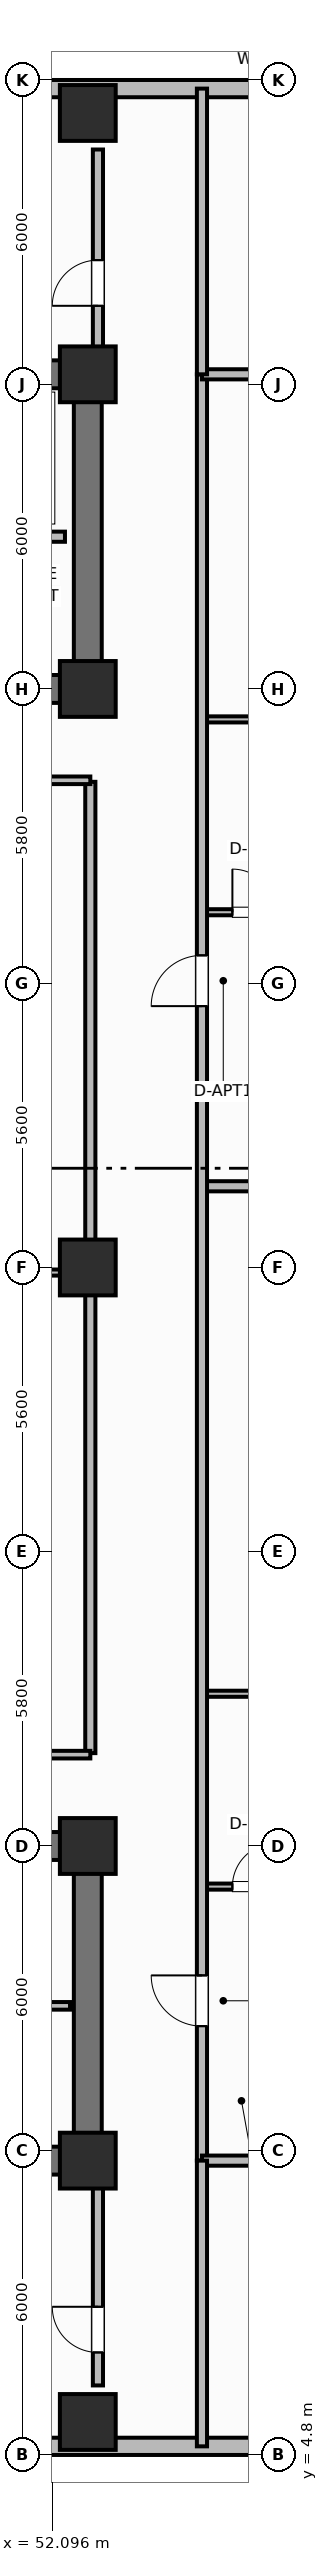
"""IFC4 building model, lengths in metres.
Left out: names, types, materials, properties, quantities, classifications, styles, units other than length and angle.
Written with IfcOpenShell. Run it as: python <this file> out.ifc"""

import sys

from ifc_helpers import new_model, si_unit, direction, frame, frame_2d, origin, origin_2d, place, context, subcontext, project, spatial, rectangle, extrude, element, fill, save


model = new_model("IFC4")
c1 = context("Model", 3, precision=1e-05, world=origin(), true_north=direction((0.0, 1.0)))
c2 = subcontext(c1, "Body", "Model", "MODEL_VIEW")
j1 = project(units=[si_unit("LENGTHUNIT", "METRE"), si_unit("PLANEANGLEUNIT", "RADIAN")], contexts=[c1])
p1 = place(None, origin())
s1 = spatial("IfcSite", under=j1, at=p1, CompositionType="ELEMENT")
p2 = place(p1, origin())
s2 = spatial("IfcBuilding", under=s1, at=p2, CompositionType="ELEMENT")
p3 = place(p2, frame((0.0, 0.0, 129.0)))
s3 = spatial("IfcBuildingStorey", under=s2, at=p3, CompositionType="ELEMENT", Elevation=129.0)
p4 = place(p3, frame((52.8, 10.6, 0.0), z_axis=(0.0, 0.0, 1.0), x_axis=(-1.0, 0.0, 0.0)))
e1 = element("IfcWall", 1, at=p4, inside=s3, PredefinedType="SHEAR", context=c2, shape_type="SweptSolid", body=[
    extrude(rectangle(XDim=27.2, YDim=0.55, at=frame_2d((13.6, 0.0))), origin(), (0.0, 0.0, 1.0), 3.7),
])
p5 = place(p3, frame((52.8, 10.875, 0.0), z_axis=(0.0, 0.0, 1.0), x_axis=(0.0, 1.0, 0.0)))
e2 = element("IfcWall", 2, at=p5, inside=s3, PredefinedType="SHEAR", context=c2, shape_type="SweptSolid", body=[
    extrude(rectangle(XDim=5.65, YDim=0.55, at=frame_2d((2.825, 0.0))), origin(), (0.0, 0.0, 1.0), 3.7),
])
p6 = place(p3, frame((25.6, 16.8, 0.0), z_axis=(0.0, 0.0, 1.0), x_axis=(1.0, 0.0, 0.0)))
e3 = element("IfcWall", 3, at=p6, inside=s3, PredefinedType="SHEAR", context=c2, shape_type="SweptSolid", body=[
    extrude(rectangle(XDim=27.2, YDim=0.55, at=frame_2d((13.6, 0.0))), origin(), (0.0, 0.0, 1.0), 3.7),
])
p7 = place(p6, frame((1.7, 0.0, 0.0)))
e4 = element("IfcOpeningElement", 4, at=p7, cuts=e3, PredefinedType="OPENING", context=c2, shape_type="SweptSolid", body=[
    extrude(rectangle(XDim=1.1, YDim=2.15, at=frame_2d((0.55, 1.075))), frame((0.0, 0.285, 0.0), z_axis=(0.0, -1.0, 0.0), x_axis=(1.0, 0.0, 0.0)), (0.0, 0.0, 1.0), 0.57),
])
p8 = place(p6, frame((4.45, 0.0, 0.0)))
e5 = element("IfcOpeningElement", 5, at=p8, cuts=e3, PredefinedType="OPENING", context=c2, shape_type="SweptSolid", body=[
    extrude(rectangle(XDim=0.85, YDim=2.1, at=frame_2d((0.425, 1.05))), frame((0.0, 0.285, 0.0), z_axis=(0.0, -1.0, 0.0), x_axis=(1.0, 0.0, 0.0)), (0.0, 0.0, 1.0), 0.57),
])
p9 = place(p6, frame((6.5, 0.0, 0.0)))
e6 = element("IfcOpeningElement", 6, at=p9, cuts=e3, PredefinedType="OPENING", context=c2, shape_type="SweptSolid", body=[
    extrude(rectangle(XDim=0.85, YDim=2.1, at=frame_2d((0.425, 1.05))), frame((0.0, 0.285, 0.0), z_axis=(0.0, -1.0, 0.0), x_axis=(1.0, 0.0, 0.0)), (0.0, 0.0, 1.0), 0.57),
])
p10 = place(p6, frame((13.0, 0.0, 0.0)))
e7 = element("IfcOpeningElement", 7, at=p10, cuts=e3, PredefinedType="OPENING", context=c2, shape_type="SweptSolid", body=[
    extrude(rectangle(XDim=1.2, YDim=2.15, at=frame_2d((0.6, 1.075))), frame((0.0, 0.285, 0.0), z_axis=(0.0, -1.0, 0.0), x_axis=(1.0, 0.0, 0.0)), (0.0, 0.0, 1.0), 0.57),
])
p11 = place(p6, frame((19.8, 0.0, 0.0)))
e8 = element("IfcOpeningElement", 8, at=p11, cuts=e3, PredefinedType="OPENING", context=c2, shape_type="SweptSolid", body=[
    extrude(rectangle(XDim=0.85, YDim=2.1, at=frame_2d((0.425, 1.05))), frame((0.0, 0.285, 0.0), z_axis=(0.0, -1.0, 0.0), x_axis=(1.0, 0.0, 0.0)), (0.0, 0.0, 1.0), 0.57),
])
p12 = place(p6, frame((24.2, 0.0, 0.0)))
e9 = element("IfcOpeningElement", 9, at=p12, cuts=e3, PredefinedType="OPENING", context=c2, shape_type="SweptSolid", body=[
    extrude(rectangle(XDim=0.85, YDim=2.1, at=frame_2d((0.425, 1.05))), frame((0.0, 0.285, 0.0), z_axis=(0.0, -1.0, 0.0), x_axis=(1.0, 0.0, 0.0)), (0.0, 0.0, 1.0), 0.57),
])
p13 = place(p3, frame((25.6, 45.8, 0.0), z_axis=(0.0, 0.0, 1.0), x_axis=(1.0, 0.0, 0.0)))
e10 = element("IfcWall", 10, at=p13, inside=s3, PredefinedType="SHEAR", context=c2, shape_type="SweptSolid", body=[
    extrude(rectangle(XDim=27.2, YDim=0.55, at=frame_2d((13.6, 0.0))), origin(), (0.0, 0.0, 1.0), 3.7),
])
p14 = place(p3, frame((52.8, 39.875, 0.0), z_axis=(0.0, 0.0, 1.0), x_axis=(0.0, 1.0, 0.0)))
e11 = element("IfcWall", 11, at=p14, inside=s3, PredefinedType="SHEAR", context=c2, shape_type="SweptSolid", body=[
    extrude(rectangle(XDim=5.65, YDim=0.55, at=frame_2d((2.825, 0.0))), origin(), (0.0, 0.0, 1.0), 3.7),
])
p15 = place(p3, frame((52.8, 39.6, 0.0), z_axis=(0.0, 0.0, 1.0), x_axis=(-1.0, 0.0, 0.0)))
e12 = element("IfcWall", 12, at=p15, inside=s3, PredefinedType="SHEAR", context=c2, shape_type="SweptSolid", body=[
    extrude(rectangle(XDim=27.2, YDim=0.55, at=frame_2d((13.6, 0.0))), origin(), (0.0, 0.0, 1.0), 3.7),
])
p16 = place(p15, frame((24.3, 0.0, 0.0)))
e13 = element("IfcOpeningElement", 13, at=p16, cuts=e12, PredefinedType="OPENING", context=c2, shape_type="SweptSolid", body=[
    extrude(rectangle(XDim=1.1, YDim=2.15, at=frame_2d((0.55, 1.075))), frame((0.0, 0.285, 0.0), z_axis=(0.0, -1.0, 0.0), x_axis=(1.0, 0.0, 0.0)), (0.0, 0.0, 1.0), 0.57),
])
p17 = place(p15, frame((21.85, 0.0, 0.0)))
e14 = element("IfcOpeningElement", 14, at=p17, cuts=e12, PredefinedType="OPENING", context=c2, shape_type="SweptSolid", body=[
    extrude(rectangle(XDim=0.85, YDim=2.1, at=frame_2d((0.425, 1.05))), frame((0.0, 0.285, 0.0), z_axis=(0.0, -1.0, 0.0), x_axis=(1.0, 0.0, 0.0)), (0.0, 0.0, 1.0), 0.57),
])
p18 = place(p15, frame((19.85, 0.0, 0.0)))
e15 = element("IfcOpeningElement", 15, at=p18, cuts=e12, PredefinedType="OPENING", context=c2, shape_type="SweptSolid", body=[
    extrude(rectangle(XDim=0.85, YDim=2.1, at=frame_2d((0.425, 1.05))), frame((0.0, 0.285, 0.0), z_axis=(0.0, -1.0, 0.0), x_axis=(1.0, 0.0, 0.0)), (0.0, 0.0, 1.0), 0.57),
])
p19 = place(p15, frame((15.1, 0.0, 0.0)))
e16 = element("IfcOpeningElement", 16, at=p19, cuts=e12, PredefinedType="OPENING", context=c2, shape_type="SweptSolid", body=[
    extrude(rectangle(XDim=1.2, YDim=2.15, at=frame_2d((0.6, 1.075))), frame((0.0, 0.285, 0.0), z_axis=(0.0, -1.0, 0.0), x_axis=(1.0, 0.0, 0.0)), (0.0, 0.0, 1.0), 0.57),
])
p20 = place(p15, frame((11.3, 0.0, 0.0)))
e17 = element("IfcOpeningElement", 17, at=p20, cuts=e12, PredefinedType="OPENING", context=c2, shape_type="SweptSolid", body=[
    extrude(rectangle(XDim=1.3, YDim=2.2, at=frame_2d((0.65, 1.1))), frame((0.0, 0.285, 0.0), z_axis=(0.0, -1.0, 0.0), x_axis=(1.0, 0.0, 0.0)), (0.0, 0.0, 1.0), 0.57),
])
p21 = place(p15, frame((7.25, 0.0, 0.0)))
e18 = element("IfcOpeningElement", 18, at=p21, cuts=e12, PredefinedType="OPENING", context=c2, shape_type="SweptSolid", body=[
    extrude(rectangle(XDim=0.85, YDim=2.1, at=frame_2d((0.425, 1.05))), frame((0.0, 0.285, 0.0), z_axis=(0.0, -1.0, 0.0), x_axis=(1.0, 0.0, 0.0)), (0.0, 0.0, 1.0), 0.57),
])
p22 = place(p15, frame((4.6, 0.0, 0.0)))
e19 = element("IfcOpeningElement", 19, at=p22, cuts=e12, PredefinedType="OPENING", context=c2, shape_type="SweptSolid", body=[
    extrude(rectangle(XDim=0.85, YDim=2.1, at=frame_2d((0.425, 1.05))), frame((0.0, 0.285, 0.0), z_axis=(0.0, -1.0, 0.0), x_axis=(1.0, 0.0, 0.0)), (0.0, 0.0, 1.0), 0.57),
])
p23 = place(p15, frame((1.9, 0.0, 0.0)))
e20 = element("IfcOpeningElement", 20, at=p23, cuts=e12, PredefinedType="OPENING", context=c2, shape_type="SweptSolid", body=[
    extrude(rectangle(XDim=0.85, YDim=2.1, at=frame_2d((0.425, 1.05))), frame((0.0, 0.285, 0.0), z_axis=(0.0, -1.0, 0.0), x_axis=(1.0, 0.0, 0.0)), (0.0, 0.0, 1.0), 0.57),
])
for number, where, z_axis, x_axis in (
    (21, (52.8, 10.6, 0.0), (0.0, 0.0, 1.0), (1.0, 0.0, 0.0)),
    (22, (52.8, 16.8, 0.0), (0.0, 0.0, 1.0), (1.0, 0.0, 0.0)),
    (23, (52.8, 39.6, 0.0), (0.0, 0.0, 1.0), (1.0, 0.0, 0.0)),
    (24, (52.8, 45.8, 0.0), (0.0, 0.0, 1.0), (1.0, 0.0, 0.0)),
    (25, (52.8, 28.2, 0.0), (0.0, 0.0, 1.0), (1.0, 0.0, 0.0)),
    (26, (52.8, 5.45, 0.0), (0.0, 0.0, 1.0), (1.0, 0.0, 0.0)),
    (27, (52.8, 50.95, 0.0), (0.0, 0.0, 1.0), (1.0, 0.0, 0.0)),
):
    element("IfcColumn", number, at=place(p3, frame(where, z_axis=z_axis, x_axis=x_axis)), inside=s3, PredefinedType="COLUMN", context=c2, shape_type="SweptSolid", body=[
        extrude(rectangle(XDim=1.1, YDim=1.1, at=origin_2d()), origin(), (0.0, 0.0, 1.0), 3.7),
    ])
p24 = place(p3, frame((42.4, 4.97, 0.0), z_axis=(0.0, 0.0, 1.0), x_axis=(1.0, 0.0, 0.0)))
e28 = element("IfcWall", 28, at=p24, inside=s3, PredefinedType="SOLIDWALL", context=c2, shape_type="SweptSolid", body=[
    extrude(rectangle(XDim=17.4, YDim=0.34, at=frame_2d((8.7, 0.0))), origin(), (0.0, 0.0, 1.0), 2.7),
])
p25 = place(p24, frame((2.26, 0.0, 0.73)))
e29 = element("IfcOpeningElement", 29, at=p25, cuts=e28, PredefinedType="OPENING", context=c2, shape_type="SweptSolid", body=[
    extrude(rectangle(XDim=1.4, YDim=1.85, at=frame_2d((0.7, 0.925))), frame((0.0, 0.18, 0.0), z_axis=(0.0, -1.0, 0.0), x_axis=(1.0, 0.0, 0.0)), (0.0, 0.0, 1.0), 0.36),
])
p26 = place(p24, frame((5.13, 0.0, 0.73)))
e30 = element("IfcOpeningElement", 30, at=p26, cuts=e28, PredefinedType="OPENING", context=c2, shape_type="SweptSolid", body=[
    extrude(rectangle(XDim=1.4, YDim=1.85, at=frame_2d((0.7, 0.925))), frame((0.0, 0.18, 0.0), z_axis=(0.0, -1.0, 0.0), x_axis=(1.0, 0.0, 0.0)), (0.0, 0.0, 1.0), 0.36),
])
p27 = place(p24, frame((7.65, 0.0, 0.73)))
e31 = element("IfcOpeningElement", 31, at=p27, cuts=e28, PredefinedType="OPENING", context=c2, shape_type="SweptSolid", body=[
    extrude(rectangle(XDim=1.4, YDim=1.85, at=frame_2d((0.7, 0.925))), frame((0.0, 0.18, 0.0), z_axis=(0.0, -1.0, 0.0), x_axis=(1.0, 0.0, 0.0)), (0.0, 0.0, 1.0), 0.36),
])
p28 = place(p24, frame((14.44, 0.0, 0.73)))
e32 = element("IfcOpeningElement", 32, at=p28, cuts=e28, PredefinedType="OPENING", context=c2, shape_type="SweptSolid", body=[
    extrude(rectangle(XDim=1.4, YDim=1.85, at=frame_2d((0.7, 0.925))), frame((0.0, 0.18, 0.0), z_axis=(0.0, -1.0, 0.0), x_axis=(1.0, 0.0, 0.0)), (0.0, 0.0, 1.0), 0.36),
])
p29 = place(p3, frame((59.8, 51.43, 0.0), z_axis=(0.0, 0.0, 1.0), x_axis=(-1.0, 0.0, 0.0)))
e33 = element("IfcWall", 33, at=p29, inside=s3, PredefinedType="SOLIDWALL", context=c2, shape_type="SweptSolid", body=[
    extrude(rectangle(XDim=17.4, YDim=0.34, at=frame_2d((8.7, 0.0))), origin(), (0.0, 0.0, 1.0), 2.7),
])
p30 = place(p29, frame((1.762, 0.0, 0.73)))
e34 = element("IfcOpeningElement", 34, at=p30, cuts=e33, PredefinedType="OPENING", context=c2, shape_type="SweptSolid", body=[
    extrude(rectangle(XDim=1.8, YDim=1.85, at=frame_2d((0.9, 0.925))), frame((0.0, 0.18, 0.0), z_axis=(0.0, -1.0, 0.0), x_axis=(1.0, 0.0, 0.0)), (0.0, 0.0, 1.0), 0.36),
])
p31 = place(p29, frame((9.812, 0.0, 0.73)))
e35 = element("IfcOpeningElement", 35, at=p31, cuts=e33, PredefinedType="OPENING", context=c2, shape_type="SweptSolid", body=[
    extrude(rectangle(XDim=1.8, YDim=1.85, at=frame_2d((0.9, 0.925))), frame((0.0, 0.18, 0.0), z_axis=(0.0, -1.0, 0.0), x_axis=(1.0, 0.0, 0.0)), (0.0, 0.0, 1.0), 0.36),
])
p32 = place(p29, frame((13.488, 0.0, 0.73)))
e36 = element("IfcOpeningElement", 36, at=p32, cuts=e33, PredefinedType="OPENING", context=c2, shape_type="SweptSolid", body=[
    extrude(rectangle(XDim=1.8, YDim=1.85, at=frame_2d((0.9, 0.925))), frame((0.0, 0.18, 0.0), z_axis=(0.0, -1.0, 0.0), x_axis=(1.0, 0.0, 0.0)), (0.0, 0.0, 1.0), 0.36),
])
p33 = place(p3, frame((48.05, 13.65, 0.0), z_axis=(0.0, 0.0, 1.0), x_axis=(1.0, 0.0, 0.0)))
e37 = element("IfcWall", 37, at=p33, inside=s3, PredefinedType="PARTITIONING", context=c2, shape_type="SweptSolid", body=[
    extrude(rectangle(XDim=4.4, YDim=0.15, at=frame_2d((2.2, 0.0))), origin(), (0.0, 0.0, 1.0), 2.53),
])
p34 = place(p33, frame((1.6, 0.0, 0.0)))
e38 = element("IfcOpeningElement", 38, at=p34, cuts=e37, PredefinedType="OPENING", context=c2, shape_type="SweptSolid", body=[
    extrude(rectangle(XDim=0.85, YDim=2.1, at=frame_2d((0.425, 1.05))), frame((0.0, 0.085, 0.0), z_axis=(0.0, -1.0, 0.0), x_axis=(1.0, 0.0, 0.0)), (0.0, 0.0, 1.0), 0.17),
])
p35 = place(p3, frame((52.35, 42.6, 0.0), z_axis=(0.0, 0.0, 1.0), x_axis=(-1.0, 0.0, 0.0)))
e39 = element("IfcWall", 39, at=p35, inside=s3, PredefinedType="PARTITIONING", context=c2, shape_type="SweptSolid", body=[
    extrude(rectangle(XDim=8.8, YDim=0.2, at=frame_2d((4.4, 0.0))), origin(), (0.0, 0.0, 1.0), 2.53),
])
p36 = place(p35, frame((7.1, 0.0, 0.0)))
e40 = element("IfcOpeningElement", 40, at=p36, cuts=e39, PredefinedType="OPENING", context=c2, shape_type="SweptSolid", body=[
    extrude(rectangle(XDim=1.0, YDim=2.15, at=frame_2d((0.5, 1.075))), frame((0.0, 0.11, 0.0), z_axis=(0.0, -1.0, 0.0), x_axis=(1.0, 0.0, 0.0)), (0.0, 0.0, 1.0), 0.22),
])
p37 = place(p3, frame((52.85, 18.63, 0.0), z_axis=(0.0, 0.0, 1.0), x_axis=(0.0, 1.0, 0.0)))
e41 = element("IfcWall", 41, at=p37, inside=s3, PredefinedType="PARTITIONING", context=c2, shape_type="SweptSolid", body=[
    extrude(rectangle(XDim=19.14, YDim=0.2, at=frame_2d((9.57, 0.0))), origin(), (0.0, 0.0, 1.0), 2.53),
])
for number, where, z_axis, x_axis in (
    (42, (46.35, 18.6, 0.0), (0.0, 0.0, 1.0), (1.0, 0.0, 0.0)),
    (43, (46.35, 37.8, 0.0), (0.0, 0.0, 1.0), (1.0, 0.0, 0.0)),
):
    element("IfcWall", number, at=place(p3, frame(where, z_axis=z_axis, x_axis=x_axis)), inside=s3, PredefinedType="PARTITIONING", context=c2, shape_type="SweptSolid", body=[
        extrude(rectangle(XDim=6.5, YDim=0.15, at=frame_2d((3.25, 0.0))), origin(), (0.0, 0.0, 1.0), 2.53),
    ])
p38 = place(p3, frame((46.38, 28.1, 0.0), z_axis=(0.0, 0.0, 1.0), x_axis=(1.0, 0.0, 0.0)))
e44 = element("IfcWall", 44, at=p38, inside=s3, PredefinedType="PARTITIONING", context=c2, shape_type="SweptSolid", body=[
    extrude(rectangle(XDim=6.42, YDim=0.12, at=frame_2d((3.21, 0.0))), origin(), (0.0, 0.0, 1.0), 2.53),
])
p39 = place(p3, frame((55.05, 16.0, 0.0), z_axis=(0.0, 0.0, 1.0), x_axis=(1.0, 0.0, 0.0)))
e45 = element("IfcWall", 45, at=p39, inside=s3, PredefinedType="PARTITIONING", context=c2, shape_type="SweptSolid", body=[
    extrude(rectangle(XDim=2.25, YDim=0.12, at=frame_2d((1.125, 0.0))), origin(), (0.0, 0.0, 1.0), 2.53),
])
p40 = place(p39, frame((0.6, 0.0, 0.0)))
e46 = element("IfcOpeningElement", 46, at=p40, cuts=e45, PredefinedType="OPENING", context=c2, shape_type="SweptSolid", body=[
    extrude(rectangle(XDim=0.85, YDim=2.1, at=frame_2d((0.425, 1.05))), frame((0.0, 0.07, 0.0), z_axis=(0.0, -1.0, 0.0), x_axis=(1.0, 0.0, 0.0)), (0.0, 0.0, 1.0), 0.14),
])
p41 = place(p3, frame((55.05, 19.8, 0.0), z_axis=(0.0, 0.0, 1.0), x_axis=(1.0, 0.0, 0.0)))
e47 = element("IfcWall", 47, at=p41, inside=s3, PredefinedType="PARTITIONING", context=c2, shape_type="SweptSolid", body=[
    extrude(rectangle(XDim=2.25, YDim=0.12, at=frame_2d((1.125, 0.0))), origin(), (0.0, 0.0, 1.0), 2.53),
])
p42 = place(p3, frame((55.05, 29.8, 0.0), z_axis=(0.0, 0.0, 1.0), x_axis=(1.0, 0.0, 0.0)))
e48 = element("IfcWall", 48, at=p42, inside=s3, PredefinedType="PARTITIONING", context=c2, shape_type="SweptSolid", body=[
    extrude(rectangle(XDim=8.123, YDim=0.2, at=frame_2d((4.062, 0.0))), origin(), (0.0, 0.0, 1.0), 2.53),
])
p43 = place(p3, frame((55.05, 35.2, 0.0), z_axis=(0.0, 0.0, 1.0), x_axis=(1.0, 0.0, 0.0)))
e49 = element("IfcWall", 49, at=p43, inside=s3, PredefinedType="PARTITIONING", context=c2, shape_type="SweptSolid", body=[
    extrude(rectangle(XDim=2.25, YDim=0.12, at=frame_2d((1.125, 0.0))), origin(), (0.0, 0.0, 1.0), 2.53),
])
p44 = place(p43, frame((0.6, 0.0, 0.0)))
e50 = element("IfcOpeningElement", 50, at=p44, cuts=e49, PredefinedType="OPENING", context=c2, shape_type="SweptSolid", body=[
    extrude(rectangle(XDim=0.85, YDim=2.1, at=frame_2d((0.425, 1.05))), frame((0.0, 0.07, 0.0), z_axis=(0.0, -1.0, 0.0), x_axis=(1.0, 0.0, 0.0)), (0.0, 0.0, 1.0), 0.14),
])
p45 = place(p3, frame((55.05, 39.0, 0.0), z_axis=(0.0, 0.0, 1.0), x_axis=(1.0, 0.0, 0.0)))
e51 = element("IfcWall", 51, at=p45, inside=s3, PredefinedType="PARTITIONING", context=c2, shape_type="SweptSolid", body=[
    extrude(rectangle(XDim=2.25, YDim=0.12, at=frame_2d((1.125, 0.0))), origin(), (0.0, 0.0, 1.0), 2.53),
])
p46 = place(p3, frame((55.05, 10.6, 0.0), z_axis=(0.0, 0.0, 1.0), x_axis=(0.0, 1.0, 0.0)))
e52 = element("IfcWall", 52, at=p46, inside=s3, PredefinedType="PARTITIONING", context=c2, shape_type="SweptSolid", body=[
    extrude(rectangle(XDim=35.2, YDim=0.2, at=frame_2d((17.6, 0.0))), origin(), (0.0, 0.0, 1.0), 2.53),
])
p47 = place(p46, frame((2.65, 0.0, 0.0)))
e53 = element("IfcOpeningElement", 53, at=p47, cuts=e52, PredefinedType="OPENING", context=c2, shape_type="SweptSolid", body=[
    extrude(rectangle(XDim=1.0, YDim=2.15, at=frame_2d((0.5, 1.075))), frame((0.0, 0.11, 0.0), z_axis=(0.0, -1.0, 0.0), x_axis=(1.0, 0.0, 0.0)), (0.0, 0.0, 1.0), 0.22),
])
p48 = place(p46, frame((22.75, 0.0, 0.0)))
e54 = element("IfcOpeningElement", 54, at=p48, cuts=e52, PredefinedType="OPENING", context=c2, shape_type="SweptSolid", body=[
    extrude(rectangle(XDim=1.0, YDim=2.15, at=frame_2d((0.5, 1.075))), frame((0.0, 0.11, 0.0), z_axis=(0.0, -1.0, 0.0), x_axis=(1.0, 0.0, 0.0)), (0.0, 0.0, 1.0), 0.22),
])
for number, where, z_axis, x_axis in (
    (55, (55.05, 10.6, 0.0), (0.0, 0.0, 1.0), (1.0, 0.0, 0.0)),
    (56, (55.05, 45.8, 0.0), (0.0, 0.0, 1.0), (1.0, 0.0, 0.0)),
):
    element("IfcWall", number, at=place(p3, frame(where, z_axis=z_axis, x_axis=x_axis)), inside=s3, PredefinedType="PARTITIONING", context=c2, shape_type="SweptSolid", body=[
        extrude(rectangle(XDim=8.36, YDim=0.2, at=frame_2d((4.18, 0.0))), origin(), (0.0, 0.0, 1.0), 2.53),
    ])
p49 = place(p3, frame((55.05, 4.97, 0.0), z_axis=(0.0, 0.0, 1.0), x_axis=(0.0, 1.0, 0.0)))
e57 = element("IfcWall", 57, at=p49, inside=s3, PredefinedType="PARTITIONING", context=c2, shape_type="SweptSolid", body=[
    extrude(rectangle(XDim=5.63, YDim=0.2, at=frame_2d((2.815, 0.0))), origin(), (0.0, 0.0, 1.0), 2.53),
])
p50 = place(p3, frame((55.05, 45.8, 0.0), z_axis=(0.0, 0.0, 1.0), x_axis=(0.0, 1.0, 0.0)))
e58 = element("IfcWall", 58, at=p50, inside=s3, PredefinedType="PARTITIONING", context=c2, shape_type="SweptSolid", body=[
    extrude(rectangle(XDim=5.63, YDim=0.2, at=frame_2d((2.815, 0.0))), origin(), (0.0, 0.0, 1.0), 2.53),
])
p51 = place(p3, frame((53.0, 6.17, 0.0), z_axis=(0.0, 0.0, 1.0), x_axis=(0.0, 1.0, 0.0)))
e59 = element("IfcWall", 59, at=p51, inside=s3, PredefinedType="PARTITIONING", context=c2, shape_type="SweptSolid", body=[
    extrude(rectangle(XDim=4.13, YDim=0.2, at=frame_2d((2.065, 0.0))), origin(), (0.0, 0.0, 1.0), 2.53),
])
p52 = place(p51, frame((0.65, 0.0, 0.0)))
e60 = element("IfcOpeningElement", 60, at=p52, cuts=e59, PredefinedType="OPENING", context=c2, shape_type="SweptSolid", body=[
    extrude(rectangle(XDim=0.9, YDim=2.1, at=frame_2d((0.45, 1.05))), frame((0.0, 0.11, 0.0), z_axis=(0.0, -1.0, 0.0), x_axis=(1.0, 0.0, 0.0)), (0.0, 0.0, 1.0), 0.22),
])
p53 = place(p3, frame((53.0, 46.1, 0.0), z_axis=(0.0, 0.0, 1.0), x_axis=(0.0, 1.0, 0.0)))
e61 = element("IfcWall", 61, at=p53, inside=s3, PredefinedType="PARTITIONING", context=c2, shape_type="SweptSolid", body=[
    extrude(rectangle(XDim=4.13, YDim=0.2, at=frame_2d((2.065, 0.0))), origin(), (0.0, 0.0, 1.0), 2.53),
])
p54 = place(p53, frame((1.05, 0.0, 0.0)))
e62 = element("IfcOpeningElement", 62, at=p54, cuts=e61, PredefinedType="OPENING", context=c2, shape_type="SweptSolid", body=[
    extrude(rectangle(XDim=0.9, YDim=2.1, at=frame_2d((0.45, 1.05))), frame((0.0, 0.11, 0.0), z_axis=(0.0, -1.0, 0.0), x_axis=(1.0, 0.0, 0.0)), (0.0, 0.0, 1.0), 0.22),
])
p55 = place(p40, origin())
e63 = element("IfcDoor", 63, at=p55, inside=s3, OperationType="SINGLE_SWING_RIGHT", PredefinedType="DOOR", context=c2, shape_type="SweptSolid", body=[
    extrude(rectangle(XDim=0.85, YDim=2.1, at=frame_2d((0.425, 1.05))), frame((0.0, 0.025, 0.0), z_axis=(0.0, -1.0, 0.0), x_axis=(1.0, 0.0, 0.0)), (0.0, 0.0, 1.0), 0.05),
])
fill(e46, e63)
p56 = place(p44, origin())
e64 = element("IfcDoor", 64, at=p56, inside=s3, OperationType="SINGLE_SWING_LEFT", PredefinedType="DOOR", context=c2, shape_type="SweptSolid", body=[
    extrude(rectangle(XDim=0.85, YDim=2.1, at=frame_2d((0.425, 1.05))), frame((0.0, 0.025, 0.0), z_axis=(0.0, -1.0, 0.0), x_axis=(1.0, 0.0, 0.0)), (0.0, 0.0, 1.0), 0.05),
])
fill(e50, e64)
p57 = place(p47, origin())
e65 = element("IfcDoor", 65, at=p57, inside=s3, OperationType="SINGLE_SWING_RIGHT", PredefinedType="DOOR", context=c2, shape_type="SweptSolid", body=[
    extrude(rectangle(XDim=1.0, YDim=2.15, at=frame_2d((0.5, 1.075))), frame((0.0, 0.025, 0.0), z_axis=(0.0, -1.0, 0.0), x_axis=(1.0, 0.0, 0.0)), (0.0, 0.0, 1.0), 0.05),
])
fill(e53, e65)
p58 = place(p48, origin())
e66 = element("IfcDoor", 66, at=p58, inside=s3, OperationType="SINGLE_SWING_LEFT", PredefinedType="DOOR", context=c2, shape_type="SweptSolid", body=[
    extrude(rectangle(XDim=1.0, YDim=2.15, at=frame_2d((0.5, 1.075))), frame((0.0, 0.025, 0.0), z_axis=(0.0, -1.0, 0.0), x_axis=(1.0, 0.0, 0.0)), (0.0, 0.0, 1.0), 0.05),
])
fill(e54, e66)
p59 = place(p52, origin())
e67 = element("IfcDoor", 67, at=p59, inside=s3, OperationType="SINGLE_SWING_RIGHT", PredefinedType="DOOR", context=c2, shape_type="SweptSolid", body=[
    extrude(rectangle(XDim=0.9, YDim=2.1, at=frame_2d((0.45, 1.05))), frame((0.0, 0.025, 0.0), z_axis=(0.0, -1.0, 0.0), x_axis=(1.0, 0.0, 0.0)), (0.0, 0.0, 1.0), 0.05),
])
fill(e60, e67)
p60 = place(p54, origin())
e68 = element("IfcDoor", 68, at=p60, inside=s3, OperationType="SINGLE_SWING_LEFT", PredefinedType="DOOR", context=c2, shape_type="SweptSolid", body=[
    extrude(rectangle(XDim=0.9, YDim=2.1, at=frame_2d((0.45, 1.05))), frame((0.0, 0.025, 0.0), z_axis=(0.0, -1.0, 0.0), x_axis=(1.0, 0.0, 0.0)), (0.0, 0.0, 1.0), 0.05),
])
fill(e62, e68)
save(model, sys.argv[1])
